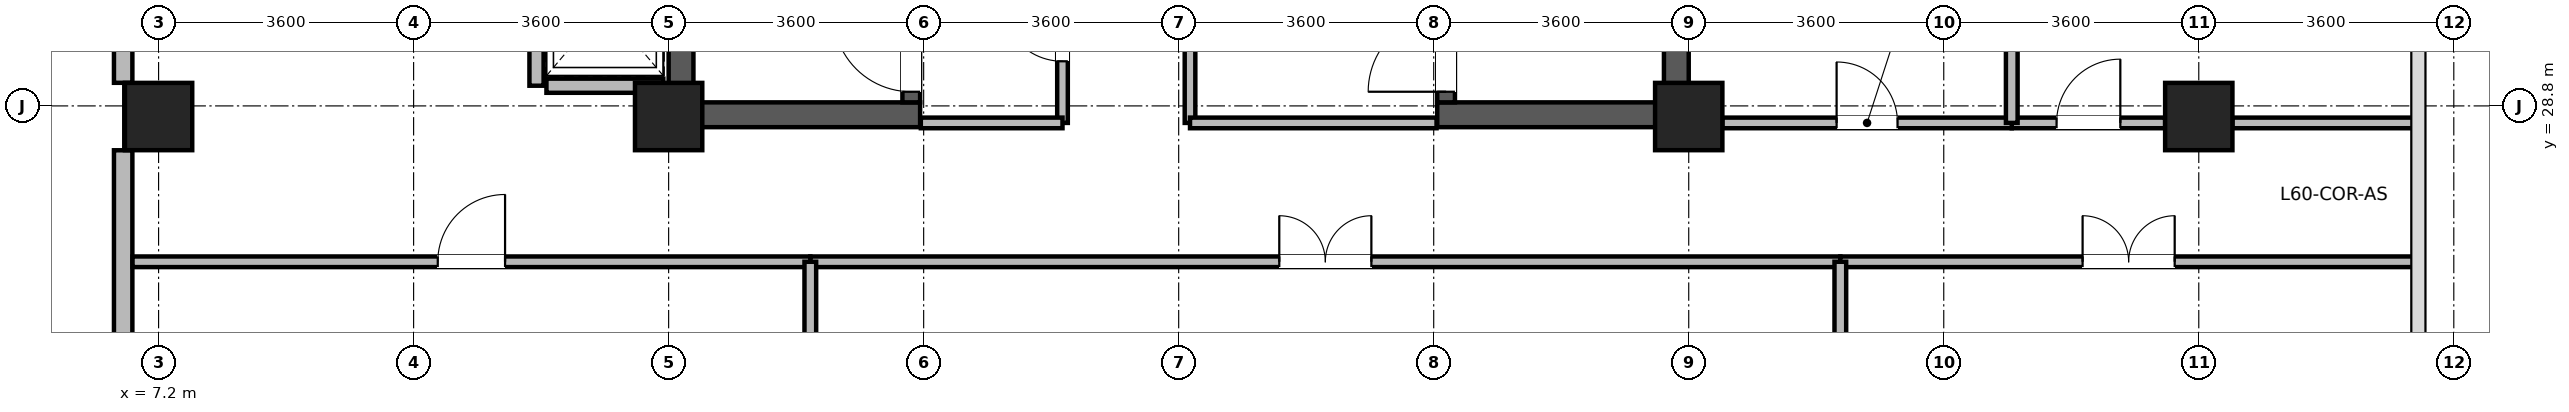
"""IFC4 building model, lengths in metres.
Left out: names, types, materials, properties, quantities, classifications, styles, units other than length and angle.
Written with IfcOpenShell. Run it as: python <this file> out.ifc"""

import sys

from ifc_helpers import new_model, si_unit, direction, frame, frame_2d, origin, origin_2d, place, context, subcontext, project, spatial, rectangle, extrude, source, transform, mapped, element, fill, save


model = new_model("IFC4")
c1 = context("Model", 3, precision=1e-05, world=origin(), true_north=direction((0.0, 1.0)))
c2 = subcontext(c1, "Body", "Model", "MODEL_VIEW")
j1 = project(units=[si_unit("LENGTHUNIT", "METRE"), si_unit("PLANEANGLEUNIT", "RADIAN")], contexts=[c1])
p1 = place(None, origin())
s1 = spatial("IfcSite", under=j1, at=p1, CompositionType="ELEMENT")
p2 = place(p1, origin())
s2 = spatial("IfcBuilding", under=s1, at=p2, CompositionType="ELEMENT")
p3 = place(p2, frame((0.0, 0.0, 235.1)))
s3 = spatial("IfcBuildingStorey", under=s2, at=p3, CompositionType="ELEMENT", Elevation=235.1)
for number, where, z_axis, x_axis in (
    (1, (14.575, 28.5, 0.0), (0.0, 0.0, 1.0), (0.0, 1.0, 0.0)),
    (2, (28.625, 28.5, 0.0), (0.0, 0.0, 1.0), (0.0, 1.0, 0.0)),
):
    element("IfcWall", number, at=place(p3, frame(where, z_axis=z_axis, x_axis=x_axis)), inside=s3, PredefinedType="SHEAR", context=c2, shape_type="SweptSolid", body=[
        extrude(rectangle(XDim=7.7, YDim=0.35, at=frame_2d((3.85, 0.0))), origin(), (0.0, 0.0, 1.0), 3.44),
    ])
for number, where, z_axis, x_axis in (
    (3, (14.75, 28.675, 0.0), (0.0, 0.0, 1.0), (1.0, 0.0, 0.0)),
    (4, (25.25, 28.675, 0.0), (0.0, 0.0, 1.0), (1.0, 0.0, 0.0)),
):
    element("IfcWall", number, at=place(p3, frame(where, z_axis=z_axis, x_axis=x_axis)), inside=s3, PredefinedType="SHEAR", context=c2, shape_type="SweptSolid", body=[
        extrude(rectangle(XDim=3.2, YDim=0.35, at=frame_2d((1.6, 0.0))), origin(), (0.0, 0.0, 1.0), 3.44),
    ])
p4 = place(p3, frame((17.825, 28.85, 0.0), z_axis=(0.0, 0.0, 1.0), x_axis=(0.0, 1.0, 0.0)))
e5 = element("IfcWall", 5, at=p4, inside=s3, PredefinedType="SHEAR", context=c2, shape_type="SweptSolid", body=[
    extrude(rectangle(XDim=7.0, YDim=0.25, at=frame_2d((3.5, 0.0))), origin(), (0.0, 0.0, 1.0), 3.44),
])
p5 = place(p4, frame((0.15, 0.0, 0.0)))
e6 = element("IfcOpeningElement", 6, at=p5, cuts=e5, PredefinedType="OPENING", context=c2, shape_type="SweptSolid", body=[
    extrude(rectangle(XDim=1.1, YDim=2.08, at=frame_2d((0.55, 1.04))), frame((0.0, 0.135, 0.0), z_axis=(0.0, -1.0, 0.0), x_axis=(1.0, 0.0, 0.0)), (0.0, 0.0, 1.0), 0.27),
])
p6 = place(p3, frame((25.375, 28.85, 0.0), z_axis=(0.0, 0.0, 1.0), x_axis=(0.0, 1.0, 0.0)))
e7 = element("IfcWall", 7, at=p6, inside=s3, PredefinedType="SHEAR", context=c2, shape_type="SweptSolid", body=[
    extrude(rectangle(XDim=7.0, YDim=0.25, at=frame_2d((3.5, 0.0))), origin(), (0.0, 0.0, 1.0), 3.44),
])
p7 = place(p6, frame((0.15, 0.0, 0.0)))
e8 = element("IfcOpeningElement", 8, at=p7, cuts=e7, PredefinedType="OPENING", context=c2, shape_type="SweptSolid", body=[
    extrude(rectangle(XDim=1.1, YDim=2.08, at=frame_2d((0.55, 1.04))), frame((0.0, 0.135, 0.0), z_axis=(0.0, -1.0, 0.0), x_axis=(1.0, 0.0, 0.0)), (0.0, 0.0, 1.0), 0.27),
])
m1 = source(origin(), c2, "Body", "SweptSolid", [
    extrude(rectangle(XDim=0.95, YDim=0.95, at=origin_2d()), origin(), (0.0, 0.0, 1.0), 3.7),
])
for number, where, z_axis, x_axis in (
    (9, (7.2, 28.65, 0.0), (0.0, 0.0, 1.0), (1.0, 0.0, 0.0)),
    (10, (14.4, 28.65, 0.0), (0.0, 0.0, 1.0), (1.0, 0.0, 0.0)),
    (11, (28.8, 28.65, 0.0), (0.0, 0.0, 1.0), (1.0, 0.0, 0.0)),
    (12, (36.0, 28.65, 0.0), (0.0, 0.0, 1.0), (1.0, 0.0, 0.0)),
):
    element("IfcColumn", number, at=place(p3, frame(where, z_axis=z_axis, x_axis=x_axis)), inside=s3, PredefinedType="COLUMN", context=c2, shape_type="MappedRepresentation", body=[
        mapped(m1, transform((0.0, 0.0, 0.0), x_axis=(1.0, 0.0, 0.0), y_axis=(0.0, 1.0, 0.0), z_axis=(0.0, 0.0, 1.0), scale=1.0)),
    ])
p8 = place(p3, frame((6.7, 29.126, 0.0), z_axis=(0.0, 0.0, 1.0), x_axis=(0.0, 1.0, 0.0)))
e13 = element("IfcWall", 13, at=p8, inside=s3, PredefinedType="STANDARD", context=c2, shape_type="SweptSolid", body=[
    extrude(rectangle(XDim=6.548, YDim=0.26, at=frame_2d((3.274, 0.0))), origin(), (0.0, 0.0, 1.0), 3.42),
])
p9 = place(p8, frame((1.037, 0.0, 0.85)))
e14 = element("IfcOpeningElement", 14, at=p9, cuts=e13, PredefinedType="OPENING", context=c2, shape_type="SweptSolid", body=[
    extrude(rectangle(XDim=1.2, YDim=1.75, at=frame_2d((0.6, 0.875))), frame((0.0, 0.14, 0.0), z_axis=(0.0, -1.0, 0.0), x_axis=(1.0, 0.0, 0.0)), (0.0, 0.0, 1.0), 0.28),
])
p10 = place(p8, frame((4.311, 0.0, 0.85)))
e15 = element("IfcOpeningElement", 15, at=p10, cuts=e13, PredefinedType="OPENING", context=c2, shape_type="SweptSolid", body=[
    extrude(rectangle(XDim=1.2, YDim=1.75, at=frame_2d((0.6, 0.875))), frame((0.0, 0.14, 0.0), z_axis=(0.0, -1.0, 0.0), x_axis=(1.0, 0.0, 0.0)), (0.0, 0.0, 1.0), 0.28),
])
p11 = place(p3, frame((6.7, 21.47, 0.0), z_axis=(0.0, 0.0, 1.0), x_axis=(0.0, 1.0, 0.0)))
e16 = element("IfcWall", 16, at=p11, inside=s3, PredefinedType="STANDARD", context=c2, shape_type="SweptSolid", body=[
    extrude(rectangle(XDim=6.704, YDim=0.26, at=frame_2d((3.352, 0.0))), origin(), (0.0, 0.0, 1.0), 3.42),
])
p12 = place(p11, frame((2.877, 0.0, 0.85)))
e17 = element("IfcOpeningElement", 17, at=p12, cuts=e16, PredefinedType="OPENING", context=c2, shape_type="SweptSolid", body=[
    extrude(rectangle(XDim=0.95, YDim=1.75, at=frame_2d((0.475, 0.875))), frame((0.0, 0.14, 0.0), z_axis=(0.0, -1.0, 0.0), x_axis=(1.0, 0.0, 0.0)), (0.0, 0.0, 1.0), 0.28),
])
p13 = place(p3, frame((12.675, 29.085, 0.0), z_axis=(0.0, 0.0, 1.0), x_axis=(1.0, 0.0, 0.0)))
e18 = element("IfcWall", 18, at=p13, inside=s3, PredefinedType="PARTITIONING", context=c2, shape_type="SweptSolid", body=[
    extrude(rectangle(XDim=1.65, YDim=0.2, at=frame_2d((0.825, 0.0))), origin(), (0.0, 0.0, 1.0), 3.42),
])
p14 = place(p3, frame((12.535, 29.085, 0.0), z_axis=(0.0, 0.0, 1.0), x_axis=(0.0, 1.0, 0.0)))
e19 = element("IfcWall", 19, at=p14, inside=s3, PredefinedType="PARTITIONING", context=c2, shape_type="SweptSolid", body=[
    extrude(rectangle(XDim=2.23, YDim=0.2, at=frame_2d((1.115, 0.0))), origin(), (0.0, 0.0, 1.0), 3.42),
])
p15 = place(p3, frame((16.4, 26.6, 0.0), z_axis=(0.0, 0.0, 1.0), x_axis=(1.0, 0.0, 0.0)))
e20 = element("IfcWall", 20, at=p15, inside=s3, PredefinedType="PARTITIONING", context=c2, shape_type="SweptSolid", body=[
    extrude(rectangle(XDim=14.54, YDim=0.15, at=frame_2d((7.27, 0.0))), origin(), (0.0, 0.0, 1.0), 3.42),
])
p16 = place(p15, frame((6.62, 0.0, 0.0)))
e21 = element("IfcOpeningElement", 21, at=p16, cuts=e20, PredefinedType="OPENING", context=c2, shape_type="SweptSolid", body=[
    extrude(rectangle(XDim=1.3, YDim=2.12, at=frame_2d((0.65, 1.06))), frame((0.0, 0.085, 0.0), z_axis=(0.0, -1.0, 0.0), x_axis=(1.0, 0.0, 0.0)), (0.0, 0.0, 1.0), 0.17),
])
p17 = place(p3, frame((6.832, 26.6, 0.0), z_axis=(0.0, 0.0, 1.0), x_axis=(1.0, 0.0, 0.0)))
e22 = element("IfcWall", 22, at=p17, inside=s3, PredefinedType="PARTITIONING", context=c2, shape_type="SweptSolid", body=[
    extrude(rectangle(XDim=9.568, YDim=0.15, at=frame_2d((4.784, 0.0))), origin(), (0.0, 0.0, 1.0), 3.42),
])
p18 = place(p17, frame((4.309, 0.0, 0.0)))
e23 = element("IfcOpeningElement", 23, at=p18, cuts=e22, PredefinedType="OPENING", context=c2, shape_type="SweptSolid", body=[
    extrude(rectangle(XDim=0.95, YDim=2.1, at=frame_2d((0.475, 1.05))), frame((0.0, 0.085, 0.0), z_axis=(0.0, -1.0, 0.0), x_axis=(1.0, 0.0, 0.0)), (0.0, 0.0, 1.0), 0.17),
])
p19 = place(p3, frame((30.94, 26.6, 0.0), z_axis=(0.0, 0.0, 1.0), x_axis=(1.0, 0.0, 0.0)))
e24 = element("IfcWall", 24, at=p19, inside=s3, PredefinedType="PARTITIONING", context=c2, shape_type="SweptSolid", body=[
    extrude(rectangle(XDim=8.14, YDim=0.15, at=frame_2d((4.07, 0.0))), origin(), (0.0, 0.0, 1.0), 3.42),
])
p20 = place(p19, frame((3.42, 0.0, 0.0)))
e25 = element("IfcOpeningElement", 25, at=p20, cuts=e24, PredefinedType="OPENING", context=c2, shape_type="SweptSolid", body=[
    extrude(rectangle(XDim=1.3, YDim=2.12, at=frame_2d((0.65, 1.06))), frame((0.0, 0.085, 0.0), z_axis=(0.0, -1.0, 0.0), x_axis=(1.0, 0.0, 0.0)), (0.0, 0.0, 1.0), 0.17),
])
p21 = place(p3, frame((33.36, 28.56, 0.0), z_axis=(0.0, 0.0, 1.0), x_axis=(1.0, 0.0, 0.0)))
e26 = element("IfcWall", 26, at=p21, inside=s3, PredefinedType="PARTITIONING", context=c2, shape_type="SweptSolid", body=[
    extrude(rectangle(XDim=2.165, YDim=0.15, at=frame_2d((1.083, 0.0))), origin(), (0.0, 0.0, 1.0), 2.87),
])
p22 = place(p21, frame((0.633, 0.0, 0.0)))
e27 = element("IfcOpeningElement", 27, at=p22, cuts=e26, PredefinedType="OPENING", context=c2, shape_type="SweptSolid", body=[
    extrude(rectangle(XDim=0.9, YDim=2.08, at=frame_2d((0.45, 1.04))), frame((0.0, 0.085, 0.0), z_axis=(0.0, -1.0, 0.0), x_axis=(1.0, 0.0, 0.0)), (0.0, 0.0, 1.0), 0.17),
])
p23 = place(p3, frame((36.475, 28.56, 0.0), z_axis=(0.0, 0.0, 1.0), x_axis=(1.0, 0.0, 0.0)))
e28 = element("IfcWall", 28, at=p23, inside=s3, PredefinedType="PARTITIONING", context=c2, shape_type="SweptSolid", body=[
    extrude(rectangle(XDim=2.605, YDim=0.15, at=frame_2d((1.302, 0.0))), origin(), (0.0, 0.0, 1.0), 3.42),
])
p24 = place(p3, frame((29.275, 28.56, 0.0), z_axis=(0.0, 0.0, 1.0), x_axis=(1.0, 0.0, 0.0)))
e29 = element("IfcWall", 29, at=p24, inside=s3, PredefinedType="PARTITIONING", context=c2, shape_type="SweptSolid", body=[
    extrude(rectangle(XDim=4.085, YDim=0.15, at=frame_2d((2.042, 0.0))), origin(), (0.0, 0.0, 1.0), 2.87),
])
p25 = place(p24, frame((1.613, 0.0, 0.0)))
e30 = element("IfcOpeningElement", 30, at=p25, cuts=e29, PredefinedType="OPENING", context=c2, shape_type="SweptSolid", body=[
    extrude(rectangle(XDim=0.86, YDim=2.02, at=frame_2d((0.43, 1.01))), frame((0.0, 0.085, 0.0), z_axis=(0.0, -1.0, 0.0), x_axis=(1.0, 0.0, 0.0)), (0.0, 0.0, 1.0), 0.17),
])
p26 = place(p3, frame((19.96, 28.56, 0.0), z_axis=(0.0, 0.0, 1.0), x_axis=(0.0, 1.0, 0.0)))
e31 = element("IfcWall", 31, at=p26, inside=s3, PredefinedType="PARTITIONING", context=c2, shape_type="SweptSolid", body=[
    extrude(rectangle(XDim=2.6, YDim=0.15, at=frame_2d((1.3, 0.0))), origin(), (0.0, 0.0, 1.0), 3.42),
])
p27 = place(p26, frame((0.87, 0.0, 0.0)))
e32 = element("IfcOpeningElement", 32, at=p27, cuts=e31, PredefinedType="OPENING", context=c2, shape_type="SweptSolid", body=[
    extrude(rectangle(XDim=0.86, YDim=2.02, at=frame_2d((0.43, 1.01))), frame((0.0, 0.085, 0.0), z_axis=(0.0, -1.0, 0.0), x_axis=(1.0, 0.0, 0.0)), (0.0, 0.0, 1.0), 0.17),
])
p28 = place(p3, frame((17.96, 28.56, 0.0), z_axis=(0.0, 0.0, 1.0), x_axis=(1.0, 0.0, 0.0)))
e33 = element("IfcWall", 33, at=p28, inside=s3, PredefinedType="PARTITIONING", context=c2, shape_type="SweptSolid", body=[
    extrude(rectangle(XDim=2.0, YDim=0.15, at=frame_2d((1.0, 0.0))), origin(), (0.0, 0.0, 1.0), 2.52),
])
for number, where, z_axis, x_axis in (
    (34, (16.4, 21.732, 0.0), (0.0, 0.0, 1.0), (0.0, 1.0, 0.0)),
    (35, (30.94, 21.732, 0.0), (0.0, 0.0, 1.0), (0.0, 1.0, 0.0)),
):
    element("IfcWall", number, at=place(p3, frame(where, z_axis=z_axis, x_axis=x_axis)), inside=s3, PredefinedType="PARTITIONING", context=c2, shape_type="SweptSolid", body=[
        extrude(rectangle(XDim=4.868, YDim=0.165, at=frame_2d((2.434, 0.0))), origin(), (0.0, 0.0, 1.0), 3.42),
    ])
p29 = place(p3, frame((21.76, 28.56, 0.0), z_axis=(0.0, 0.0, 1.0), x_axis=(0.0, 1.0, 0.0)))
e36 = element("IfcWall", 36, at=p29, inside=s3, PredefinedType="PARTITIONING", context=c2, shape_type="SweptSolid", body=[
    extrude(rectangle(XDim=4.6, YDim=0.15, at=frame_2d((2.3, 0.0))), origin(), (0.0, 0.0, 1.0), 3.42),
])
p30 = place(p29, frame((1.55, 0.0, 0.0)))
e37 = element("IfcOpeningElement", 37, at=p30, cuts=e36, PredefinedType="OPENING", context=c2, shape_type="SweptSolid", body=[
    extrude(rectangle(XDim=1.5, YDim=2.1, at=frame_2d((0.75, 1.05))), frame((0.0, 0.085, 0.0), z_axis=(0.0, -1.0, 0.0), x_axis=(1.0, 0.0, 0.0)), (0.0, 0.0, 1.0), 0.17),
])
p31 = place(p3, frame((33.36, 28.56, 0.0), z_axis=(0.0, 0.0, 1.0), x_axis=(0.0, 1.0, 0.0)))
e38 = element("IfcWall", 38, at=p31, inside=s3, PredefinedType="PARTITIONING", context=c2, shape_type="SweptSolid", body=[
    extrude(rectangle(XDim=3.84, YDim=0.165, at=frame_2d((1.92, 0.0))), origin(), (0.0, 0.0, 1.0), 3.42),
])
p32 = place(p3, frame((21.76, 28.56, 0.0), z_axis=(0.0, 0.0, 1.0), x_axis=(1.0, 0.0, 0.0)))
e39 = element("IfcWall", 39, at=p32, inside=s3, PredefinedType="PARTITIONING", context=c2, shape_type="SweptSolid", body=[
    extrude(rectangle(XDim=3.48, YDim=0.15, at=frame_2d((1.74, 0.0))), origin(), (0.0, 0.0, 1.0), 2.52),
])
p33 = place(p5, origin())
e40 = element("IfcDoor", 40, at=p33, inside=s3, OperationType="SINGLE_SWING_RIGHT", PredefinedType="DOOR", context=c2, shape_type="SweptSolid", body=[
    extrude(rectangle(XDim=1.1, YDim=2.08, at=frame_2d((0.55, 1.04))), frame((0.0, 0.025, 0.0), z_axis=(0.0, -1.0, 0.0), x_axis=(1.0, 0.0, 0.0)), (0.0, 0.0, 1.0), 0.05),
])
fill(e6, e40)
p34 = place(p7, origin())
e41 = element("IfcDoor", 41, at=p34, inside=s3, OperationType="SINGLE_SWING_LEFT", PredefinedType="DOOR", context=c2, shape_type="SweptSolid", body=[
    extrude(rectangle(XDim=1.1, YDim=2.08, at=frame_2d((0.55, 1.04))), frame((0.0, 0.025, 0.0), z_axis=(0.0, -1.0, 0.0), x_axis=(1.0, 0.0, 0.0)), (0.0, 0.0, 1.0), 0.05),
])
fill(e8, e41)
p35 = place(p16, origin())
e42 = element("IfcDoor", 42, at=p35, inside=s3, OperationType="DOUBLE_DOOR_SINGLE_SWING", PredefinedType="DOOR", context=c2, shape_type="SweptSolid", body=[
    extrude(rectangle(XDim=1.3, YDim=2.12, at=frame_2d((0.65, 1.06))), frame((0.0, 0.025, 0.0), z_axis=(0.0, -1.0, 0.0), x_axis=(1.0, 0.0, 0.0)), (0.0, 0.0, 1.0), 0.05),
])
fill(e21, e42)
p36 = place(p18, origin())
e43 = element("IfcDoor", 43, at=p36, inside=s3, OperationType="SINGLE_SWING_RIGHT", PredefinedType="DOOR", context=c2, shape_type="SweptSolid", body=[
    extrude(rectangle(XDim=0.95, YDim=2.1, at=frame_2d((0.475, 1.05))), frame((0.0, 0.025, 0.0), z_axis=(0.0, -1.0, 0.0), x_axis=(1.0, 0.0, 0.0)), (0.0, 0.0, 1.0), 0.05),
])
fill(e23, e43)
p37 = place(p20, origin())
e44 = element("IfcDoor", 44, at=p37, inside=s3, OperationType="DOUBLE_DOOR_SINGLE_SWING", PredefinedType="DOOR", context=c2, shape_type="SweptSolid", body=[
    extrude(rectangle(XDim=1.3, YDim=2.12, at=frame_2d((0.65, 1.06))), frame((0.0, 0.025, 0.0), z_axis=(0.0, -1.0, 0.0), x_axis=(1.0, 0.0, 0.0)), (0.0, 0.0, 1.0), 0.05),
])
fill(e25, e44)
p38 = place(p22, origin())
e45 = element("IfcDoor", 45, at=p38, inside=s3, OperationType="SINGLE_SWING_RIGHT", PredefinedType="DOOR", context=c2, shape_type="SweptSolid", body=[
    extrude(rectangle(XDim=0.9, YDim=2.08, at=frame_2d((0.45, 1.04))), frame((0.0, 0.025, 0.0), z_axis=(0.0, -1.0, 0.0), x_axis=(1.0, 0.0, 0.0)), (0.0, 0.0, 1.0), 0.05),
])
fill(e27, e45)
p39 = place(p25, origin())
e46 = element("IfcDoor", 46, at=p39, inside=s3, OperationType="SINGLE_SWING_LEFT", PredefinedType="DOOR", context=c2, shape_type="SweptSolid", body=[
    extrude(rectangle(XDim=0.86, YDim=2.02, at=frame_2d((0.43, 1.01))), frame((0.0, 0.025, 0.0), z_axis=(0.0, -1.0, 0.0), x_axis=(1.0, 0.0, 0.0)), (0.0, 0.0, 1.0), 0.05),
])
fill(e30, e46)
p40 = place(p27, origin())
e47 = element("IfcDoor", 47, at=p40, inside=s3, OperationType="SINGLE_SWING_RIGHT", PredefinedType="DOOR", context=c2, shape_type="SweptSolid", body=[
    extrude(rectangle(XDim=0.86, YDim=2.02, at=frame_2d((0.43, 1.01))), frame((0.0, 0.025, 0.0), z_axis=(0.0, -1.0, 0.0), x_axis=(1.0, 0.0, 0.0)), (0.0, 0.0, 1.0), 0.05),
])
fill(e32, e47)
save(model, sys.argv[1])
